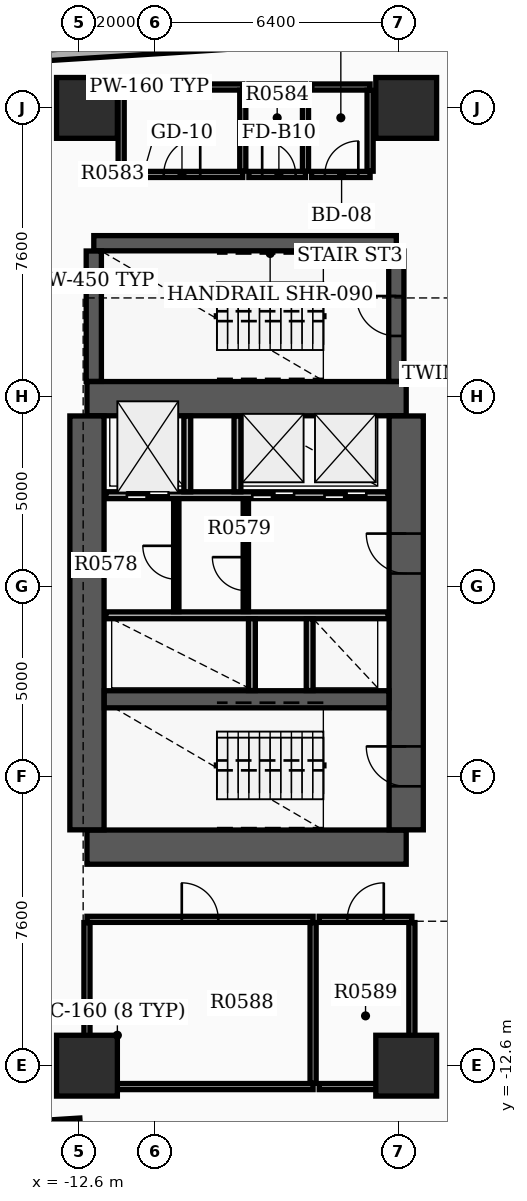
"""IFC4 building model, lengths in metres.
Left out: names, types, materials, properties, quantities, classifications, styles, units other than length and angle.
Written with IfcOpenShell. Run it as: python <this file> out.ifc"""

import sys

from ifc_helpers import new_model, si_unit, direction, frame, frame_2d, origin, origin_2d, place, context, subcontext, project, spatial, rectangle, extrude, element, fill, save


model = new_model("IFC4")
c1 = context("Model", 3, precision=1e-05, world=origin(), true_north=direction((0.0, 1.0)))
c2 = subcontext(c1, "Body", "Model", "MODEL_VIEW")
j1 = project(units=[si_unit("LENGTHUNIT", "METRE"), si_unit("PLANEANGLEUNIT", "RADIAN")], contexts=[c1])
p1 = place(None, origin())
s1 = spatial("IfcSite", under=j1, at=p1, CompositionType="ELEMENT")
p2 = place(p1, origin())
s2 = spatial("IfcBuilding", under=s1, at=p2, CompositionType="ELEMENT")
p3 = place(p2, frame((0.0, 0.0, 39.3)))
s3 = spatial("IfcBuildingStorey", under=s2, at=p3, CompositionType="ELEMENT", Elevation=39.3)
for number, where, z_axis, x_axis in (
    (1, (-12.4, -6.85, 0.0), (0.0, 0.0, 1.0), (1.0, 0.0, 0.0)),
    (2, (-12.4, 4.95, 0.0), (0.0, 0.0, 1.0), (1.0, 0.0, 0.0)),
):
    element("IfcWall", number, at=place(p3, frame(where, z_axis=z_axis, x_axis=x_axis)), inside=s3, PredefinedType="SHEAR", context=c2, shape_type="SweptSolid", body=[
        extrude(rectangle(XDim=8.4, YDim=0.9, at=frame_2d((4.2, 0.0))), origin(), (0.0, 0.0, 1.0), 3.7),
    ])
p4 = place(p3, frame((-12.4, -6.395, 0.0), z_axis=(0.0, 0.0, 1.0), x_axis=(0.0, 1.0, 0.0)))
e3 = element("IfcWall", 3, at=p4, inside=s3, PredefinedType="SHEAR", context=c2, shape_type="SweptSolid", body=[
    extrude(rectangle(XDim=10.89, YDim=0.9, at=frame_2d((5.445, 0.0))), origin(), (0.0, 0.0, 1.0), 3.7),
])
p5 = place(p3, frame((-4.0, -6.395, 0.0), z_axis=(0.0, 0.0, 1.0), x_axis=(0.0, 1.0, 0.0)))
e4 = element("IfcWall", 4, at=p5, inside=s3, PredefinedType="SHEAR", context=c2, shape_type="SweptSolid", body=[
    extrude(rectangle(XDim=10.89, YDim=0.9, at=frame_2d((5.445, 0.0))), origin(), (0.0, 0.0, 1.0), 3.7),
])
p6 = place(p5, frame((1.145, 0.0, 0.0)))
e5 = element("IfcOpeningElement", 5, at=p6, cuts=e4, PredefinedType="OPENING", context=c2, shape_type="SweptSolid", body=[
    extrude(rectangle(XDim=1.05, YDim=2.15, at=frame_2d((0.525, 1.075))), frame((0.0, 0.46, 0.0), z_axis=(0.0, -1.0, 0.0), x_axis=(1.0, 0.0, 0.0)), (0.0, 0.0, 1.0), 0.92),
])
p7 = place(p5, frame((6.745, 0.0, 0.0)))
e6 = element("IfcOpeningElement", 6, at=p7, cuts=e4, PredefinedType="OPENING", context=c2, shape_type="SweptSolid", body=[
    extrude(rectangle(XDim=1.05, YDim=2.15, at=frame_2d((0.525, 1.075))), frame((0.0, 0.46, 0.0), z_axis=(0.0, -1.0, 0.0), x_axis=(1.0, 0.0, 0.0)), (0.0, 0.0, 1.0), 0.92),
])
p8 = place(p3, frame((-11.945, -2.96, 0.0), z_axis=(0.0, 0.0, 1.0), x_axis=(1.0, 0.0, 0.0)))
e7 = element("IfcWall", 7, at=p8, inside=s3, PredefinedType="SHEAR", context=c2, shape_type="SweptSolid", body=[
    extrude(rectangle(XDim=7.49, YDim=0.45, at=frame_2d((3.745, 0.0))), origin(), (0.0, 0.0, 1.0), 3.7),
])
p9 = place(p3, frame((-12.22, 9.04, 0.0), z_axis=(0.0, 0.0, 1.0), x_axis=(1.0, 0.0, 0.0)))
e8 = element("IfcWall", 8, at=p9, inside=s3, PredefinedType="SHEAR", context=c2, shape_type="SweptSolid", body=[
    extrude(rectangle(XDim=7.96, YDim=0.4, at=frame_2d((3.98, 0.0))), origin(), (0.0, 0.0, 1.0), 3.7),
])
p10 = place(p3, frame((-12.22, 5.405, 0.0), z_axis=(0.0, 0.0, 1.0), x_axis=(0.0, 1.0, 0.0)))
e9 = element("IfcWall", 9, at=p10, inside=s3, PredefinedType="SHEAR", context=c2, shape_type="SweptSolid", body=[
    extrude(rectangle(XDim=3.43, YDim=0.4, at=frame_2d((1.715, 0.0))), origin(), (0.0, 0.0, 1.0), 3.7),
])
p11 = place(p3, frame((-4.26, 5.405, 0.0), z_axis=(0.0, 0.0, 1.0), x_axis=(0.0, 1.0, 0.0)))
e10 = element("IfcWall", 10, at=p11, inside=s3, PredefinedType="SHEAR", context=c2, shape_type="SweptSolid", body=[
    extrude(rectangle(XDim=3.43, YDim=0.4, at=frame_2d((1.715, 0.0))), origin(), (0.0, 0.0, 1.0), 3.7),
])
p12 = place(p11, frame((1.195, 0.0, 0.0)))
e11 = element("IfcOpeningElement", 11, at=p12, cuts=e10, PredefinedType="OPENING", context=c2, shape_type="SweptSolid", body=[
    extrude(rectangle(XDim=1.05, YDim=2.15, at=frame_2d((0.525, 1.075))), frame((0.0, 0.21, 0.0), z_axis=(0.0, -1.0, 0.0), x_axis=(1.0, 0.0, 0.0)), (0.0, 0.0, 1.0), 0.42),
])
for number, where, z_axis, x_axis in (
    (12, (-12.4, -12.6, 0.0), (0.0, 0.0, 1.0), (1.0, 0.0, 0.0)),
    (13, (-12.4, 12.6, 0.0), (0.0, 0.0, 1.0), (1.0, 0.0, 0.0)),
    (14, (-4.0, -12.6, 0.0), (0.0, 0.0, 1.0), (1.0, 0.0, 0.0)),
    (15, (-4.0, 12.6, 0.0), (0.0, 0.0, 1.0), (1.0, 0.0, 0.0)),
):
    element("IfcColumn", number, at=place(p3, frame(where, z_axis=z_axis, x_axis=x_axis)), inside=s3, PredefinedType="COLUMN", context=c2, shape_type="SweptSolid", body=[
        extrude(rectangle(XDim=1.6, YDim=1.6, at=origin_2d()), origin(), (0.0, 0.0, 1.0), 3.9),
    ])
p13 = place(p3, frame((-14.063, 13.945, 0.0), z_axis=(0.0, 0.0, 1.0), x_axis=(0.998027314704, 0.062781200242, 0.0)))
e16 = element("IfcWall", 16, at=p13, inside=s3, PredefinedType="STANDARD", context=c2, shape_type="SweptSolid", body=[
    extrude(rectangle(XDim=6.3, YDim=0.28, at=frame_2d((3.15, 0.0))), origin(), (0.0, 0.0, 1.0), 2.91),
])
p14 = place(p3, frame((-13.796, -14.194, 0.0), z_axis=(0.0, 0.0, 1.0), x_axis=(0.998023660242, 0.06283926796, 0.0)))
e17 = element("IfcWall", 17, at=p14, inside=s3, PredefinedType="STANDARD", context=c2, shape_type="SweptSolid", body=[
    extrude(rectangle(XDim=1.22, YDim=0.28, at=frame_2d((0.61, 0.0))), origin(), (0.0, 0.0, 1.0), 2.91),
])
p15 = place(p3, frame((-11.9, 2.41, 0.0), z_axis=(0.0, 0.0, 1.0), x_axis=(1.0, 0.0, 0.0)))
e18 = element("IfcWall", 18, at=p15, inside=s3, PredefinedType="SOLIDWALL", context=c2, shape_type="SweptSolid", body=[
    extrude(rectangle(XDim=7.42, YDim=0.18, at=frame_2d((3.71, 0.0))), origin(), (0.0, 0.0, 1.0), 2.9),
])
p16 = place(p15, frame((0.55, 0.0, 0.0)))
e19 = element("IfcOpeningElement", 19, at=p16, cuts=e18, PredefinedType="OPENING", context=c2, shape_type="SweptSolid", body=[
    extrude(rectangle(XDim=1.1, YDim=2.15, at=frame_2d((0.55, 1.075))), frame((0.0, 0.1, 0.0), z_axis=(0.0, -1.0, 0.0), x_axis=(1.0, 0.0, 0.0)), (0.0, 0.0, 1.0), 0.2),
])
p17 = place(p15, frame((3.85, 0.0, 0.0)))
e20 = element("IfcOpeningElement", 20, at=p17, cuts=e18, PredefinedType="OPENING", context=c2, shape_type="SweptSolid", body=[
    extrude(rectangle(XDim=1.1, YDim=2.15, at=frame_2d((0.55, 1.075))), frame((0.0, 0.1, 0.0), z_axis=(0.0, -1.0, 0.0), x_axis=(1.0, 0.0, 0.0)), (0.0, 0.0, 1.0), 0.2),
])
p18 = place(p15, frame((5.75, 0.0, 0.0)))
e21 = element("IfcOpeningElement", 21, at=p18, cuts=e18, PredefinedType="OPENING", context=c2, shape_type="SweptSolid", body=[
    extrude(rectangle(XDim=1.1, YDim=2.15, at=frame_2d((0.55, 1.075))), frame((0.0, 0.1, 0.0), z_axis=(0.0, -1.0, 0.0), x_axis=(1.0, 0.0, 0.0)), (0.0, 0.0, 1.0), 0.2),
])
p19 = place(p3, frame((-11.9, -0.75, 0.0), z_axis=(0.0, 0.0, 1.0), x_axis=(1.0, 0.0, 0.0)))
e22 = element("IfcWall", 22, at=p19, inside=s3, PredefinedType="SOLIDWALL", context=c2, shape_type="SweptSolid", body=[
    extrude(rectangle(XDim=7.42, YDim=0.18, at=frame_2d((3.71, 0.0))), origin(), (0.0, 0.0, 1.0), 2.9),
])
for number, where, z_axis, x_axis in (
    (23, (-9.76, 2.5, 0.0), (0.0, 0.0, 1.0), (0.0, 1.0, 0.0)),
    (24, (-8.44, 2.5, 0.0), (0.0, 0.0, 1.0), (0.0, 1.0, 0.0)),
):
    element("IfcWall", number, at=place(p3, frame(where, z_axis=z_axis, x_axis=x_axis)), inside=s3, PredefinedType="SOLIDWALL", context=c2, shape_type="SweptSolid", body=[
        extrude(rectangle(XDim=1.99, YDim=0.18, at=frame_2d((0.995, 0.0))), origin(), (0.0, 0.0, 1.0), 2.9),
    ])
for number, where, z_axis, x_axis in (
    (25, (-8.06, -2.73, 0.0), (0.0, 0.0, 1.0), (0.0, 1.0, 0.0)),
    (26, (-6.54, -2.73, 0.0), (0.0, 0.0, 1.0), (0.0, 1.0, 0.0)),
):
    element("IfcWall", number, at=place(p3, frame(where, z_axis=z_axis, x_axis=x_axis)), inside=s3, PredefinedType="SOLIDWALL", context=c2, shape_type="SweptSolid", body=[
        extrude(rectangle(XDim=1.89, YDim=0.18, at=frame_2d((0.945, 0.0))), origin(), (0.0, 0.0, 1.0), 2.9),
    ])
p20 = place(p3, frame((-8.22, -0.65, 0.0), z_axis=(0.0, 0.0, 1.0), x_axis=(0.0, 1.0, 0.0)))
e27 = element("IfcWall", 27, at=p20, inside=s3, PredefinedType="SOLIDWALL", context=c2, shape_type="SweptSolid", body=[
    extrude(rectangle(XDim=2.96, YDim=0.14, at=frame_2d((1.48, 0.0))), origin(), (0.0, 0.0, 1.0), 2.9),
])
p21 = place(p20, frame((0.55, 0.0, 0.0)))
e28 = element("IfcOpeningElement", 28, at=p21, cuts=e27, PredefinedType="OPENING", context=c2, shape_type="SweptSolid", body=[
    extrude(rectangle(XDim=0.88, YDim=2.1, at=frame_2d((0.44, 1.05))), frame((0.0, 0.08, 0.0), z_axis=(0.0, -1.0, 0.0), x_axis=(1.0, 0.0, 0.0)), (0.0, 0.0, 1.0), 0.16),
])
p22 = place(p3, frame((-10.05, -0.652, 0.0), z_axis=(0.0, 0.0, 1.0), x_axis=(0.0, 1.0, 0.0)))
e29 = element("IfcWall", 29, at=p22, inside=s3, PredefinedType="PARTITIONING", context=c2, shape_type="SweptSolid", body=[
    extrude(rectangle(XDim=2.962, YDim=0.14, at=frame_2d((1.481, 0.0))), origin(), (0.0, 0.0, 1.0), 2.9),
])
p23 = place(p22, frame((0.85, 0.0, 0.0)))
e30 = element("IfcOpeningElement", 30, at=p23, cuts=e29, PredefinedType="OPENING", context=c2, shape_type="SweptSolid", body=[
    extrude(rectangle(XDim=0.88, YDim=2.1, at=frame_2d((0.44, 1.05))), frame((0.0, 0.08, 0.0), z_axis=(0.0, -1.0, 0.0), x_axis=(1.0, 0.0, 0.0)), (0.0, 0.0, 1.0), 0.16),
])
p24 = place(p3, frame((-11.5, 10.85, 0.0), z_axis=(0.0, 0.0, 1.0), x_axis=(1.0, 0.0, 0.0)))
e31 = element("IfcWall", 31, at=p24, inside=s3, PredefinedType="PARTITIONING", context=c2, shape_type="SweptSolid", body=[
    extrude(rectangle(XDim=3.2, YDim=0.16, at=frame_2d((1.6, 0.0))), origin(), (0.0, 0.0, 1.0), 2.9),
])
p25 = place(p24, frame((1.12, 0.0, 0.0)))
e32 = element("IfcOpeningElement", 32, at=p25, cuts=e31, PredefinedType="OPENING", context=c2, shape_type="SweptSolid", body=[
    extrude(rectangle(XDim=0.96, YDim=2.15, at=frame_2d((0.48, 1.075))), frame((0.0, 0.09, 0.0), z_axis=(0.0, -1.0, 0.0), x_axis=(1.0, 0.0, 0.0)), (0.0, 0.0, 1.0), 0.18),
])
p26 = place(p3, frame((-11.5, 13.15, 0.0), z_axis=(0.0, 0.0, 1.0), x_axis=(1.0, 0.0, 0.0)))
e33 = element("IfcWall", 33, at=p26, inside=s3, PredefinedType="PARTITIONING", context=c2, shape_type="SweptSolid", body=[
    extrude(rectangle(XDim=3.2, YDim=0.16, at=frame_2d((1.6, 0.0))), origin(), (0.0, 0.0, 1.0), 2.9),
])
for number, where, z_axis, x_axis in (
    (34, (-11.5, 10.935, 0.0), (0.0, 0.0, 1.0), (0.0, 1.0, 0.0)),
    (35, (-8.3, 10.935, 0.0), (0.0, 0.0, 1.0), (0.0, 1.0, 0.0)),
):
    element("IfcWall", number, at=place(p3, frame(where, z_axis=z_axis, x_axis=x_axis)), inside=s3, PredefinedType="PARTITIONING", context=c2, shape_type="SweptSolid", body=[
        extrude(rectangle(XDim=2.13, YDim=0.16, at=frame_2d((1.065, 0.0))), origin(), (0.0, 0.0, 1.0), 2.9),
    ])
p27 = place(p3, frame((-8.14, 10.85, 0.0), z_axis=(0.0, 0.0, 1.0), x_axis=(1.0, 0.0, 0.0)))
e36 = element("IfcWall", 36, at=p27, inside=s3, PredefinedType="PARTITIONING", context=c2, shape_type="SweptSolid", body=[
    extrude(rectangle(XDim=1.49, YDim=0.16, at=frame_2d((0.745, 0.0))), origin(), (0.0, 0.0, 1.0), 2.9),
])
p28 = place(p27, frame((0.35, 0.0, 0.0)))
e37 = element("IfcOpeningElement", 37, at=p28, cuts=e36, PredefinedType="OPENING", context=c2, shape_type="SweptSolid", body=[
    extrude(rectangle(XDim=0.88, YDim=2.1, at=frame_2d((0.44, 1.05))), frame((0.0, 0.09, 0.0), z_axis=(0.0, -1.0, 0.0), x_axis=(1.0, 0.0, 0.0)), (0.0, 0.0, 1.0), 0.18),
])
p29 = place(p3, frame((-8.14, 13.15, 0.0), z_axis=(0.0, 0.0, 1.0), x_axis=(1.0, 0.0, 0.0)))
e38 = element("IfcWall", 38, at=p29, inside=s3, PredefinedType="PARTITIONING", context=c2, shape_type="SweptSolid", body=[
    extrude(rectangle(XDim=1.49, YDim=0.16, at=frame_2d((0.745, 0.0))), origin(), (0.0, 0.0, 1.0), 2.9),
])
p30 = place(p3, frame((-6.65, 10.935, 0.0), z_axis=(0.0, 0.0, 1.0), x_axis=(0.0, 1.0, 0.0)))
e39 = element("IfcWall", 39, at=p30, inside=s3, PredefinedType="PARTITIONING", context=c2, shape_type="SweptSolid", body=[
    extrude(rectangle(XDim=2.13, YDim=0.16, at=frame_2d((1.065, 0.0))), origin(), (0.0, 0.0, 1.0), 2.9),
])
p31 = place(p3, frame((-6.49, 10.85, 0.0), z_axis=(0.0, 0.0, 1.0), x_axis=(1.0, 0.0, 0.0)))
e40 = element("IfcWall", 40, at=p31, inside=s3, PredefinedType="PARTITIONING", context=c2, shape_type="SweptSolid", body=[
    extrude(rectangle(XDim=1.54, YDim=0.16, at=frame_2d((0.77, 0.0))), origin(), (0.0, 0.0, 1.0), 2.9),
])
p32 = place(p31, frame((0.35, 0.0, 0.0)))
e41 = element("IfcOpeningElement", 41, at=p32, cuts=e40, PredefinedType="OPENING", context=c2, shape_type="SweptSolid", body=[
    extrude(rectangle(XDim=0.88, YDim=2.15, at=frame_2d((0.44, 1.075))), frame((0.0, 0.09, 0.0), z_axis=(0.0, -1.0, 0.0), x_axis=(1.0, 0.0, 0.0)), (0.0, 0.0, 1.0), 0.18),
])
p33 = place(p3, frame((-6.49, 13.15, 0.0), z_axis=(0.0, 0.0, 1.0), x_axis=(1.0, 0.0, 0.0)))
e42 = element("IfcWall", 42, at=p33, inside=s3, PredefinedType="PARTITIONING", context=c2, shape_type="SweptSolid", body=[
    extrude(rectangle(XDim=1.54, YDim=0.16, at=frame_2d((0.77, 0.0))), origin(), (0.0, 0.0, 1.0), 2.9),
])
p34 = place(p3, frame((-4.95, 10.935, 0.0), z_axis=(0.0, 0.0, 1.0), x_axis=(0.0, 1.0, 0.0)))
e43 = element("IfcWall", 43, at=p34, inside=s3, PredefinedType="PARTITIONING", context=c2, shape_type="SweptSolid", body=[
    extrude(rectangle(XDim=2.13, YDim=0.16, at=frame_2d((1.065, 0.0))), origin(), (0.0, 0.0, 1.0), 2.9),
])
p35 = place(p3, frame((-12.4, -13.15, 0.0), z_axis=(0.0, 0.0, 1.0), x_axis=(1.0, 0.0, 0.0)))
e44 = element("IfcWall", 44, at=p35, inside=s3, PredefinedType="PARTITIONING", context=c2, shape_type="SweptSolid", body=[
    extrude(rectangle(XDim=5.95, YDim=0.16, at=frame_2d((2.975, 0.0))), origin(), (0.0, 0.0, 1.0), 2.9),
])
p36 = place(p3, frame((-12.4, -8.75, 0.0), z_axis=(0.0, 0.0, 1.0), x_axis=(1.0, 0.0, 0.0)))
e45 = element("IfcWall", 45, at=p36, inside=s3, PredefinedType="PARTITIONING", context=c2, shape_type="SweptSolid", body=[
    extrude(rectangle(XDim=5.95, YDim=0.16, at=frame_2d((2.975, 0.0))), origin(), (0.0, 0.0, 1.0), 2.9),
])
p37 = place(p36, frame((2.495, 0.0, 0.0)))
e46 = element("IfcOpeningElement", 46, at=p37, cuts=e45, PredefinedType="OPENING", context=c2, shape_type="SweptSolid", body=[
    extrude(rectangle(XDim=0.96, YDim=2.15, at=frame_2d((0.48, 1.075))), frame((0.0, 0.09, 0.0), z_axis=(0.0, -1.0, 0.0), x_axis=(1.0, 0.0, 0.0)), (0.0, 0.0, 1.0), 0.18),
])
for number, where, z_axis, x_axis in (
    (47, (-12.4, -13.065, 0.0), (0.0, 0.0, 1.0), (0.0, 1.0, 0.0)),
    (48, (-6.45, -13.065, 0.0), (0.0, 0.0, 1.0), (0.0, 1.0, 0.0)),
):
    element("IfcWall", number, at=place(p3, frame(where, z_axis=z_axis, x_axis=x_axis)), inside=s3, PredefinedType="PARTITIONING", context=c2, shape_type="SweptSolid", body=[
        extrude(rectangle(XDim=4.23, YDim=0.16, at=frame_2d((2.115, 0.0))), origin(), (0.0, 0.0, 1.0), 2.9),
    ])
p38 = place(p3, frame((-6.29, -13.15, 0.0), z_axis=(0.0, 0.0, 1.0), x_axis=(1.0, 0.0, 0.0)))
e49 = element("IfcWall", 49, at=p38, inside=s3, PredefinedType="PARTITIONING", context=c2, shape_type="SweptSolid", body=[
    extrude(rectangle(XDim=2.44, YDim=0.16, at=frame_2d((1.22, 0.0))), origin(), (0.0, 0.0, 1.0), 2.9),
])
p39 = place(p3, frame((-6.29, -8.75, 0.0), z_axis=(0.0, 0.0, 1.0), x_axis=(1.0, 0.0, 0.0)))
e50 = element("IfcWall", 50, at=p39, inside=s3, PredefinedType="PARTITIONING", context=c2, shape_type="SweptSolid", body=[
    extrude(rectangle(XDim=2.44, YDim=0.16, at=frame_2d((1.22, 0.0))), origin(), (0.0, 0.0, 1.0), 2.9),
])
p40 = place(p39, frame((0.74, 0.0, 0.0)))
e51 = element("IfcOpeningElement", 51, at=p40, cuts=e50, PredefinedType="OPENING", context=c2, shape_type="SweptSolid", body=[
    extrude(rectangle(XDim=0.96, YDim=2.15, at=frame_2d((0.48, 1.075))), frame((0.0, 0.09, 0.0), z_axis=(0.0, -1.0, 0.0), x_axis=(1.0, 0.0, 0.0)), (0.0, 0.0, 1.0), 0.18),
])
p41 = place(p3, frame((-3.85, -13.065, 0.0), z_axis=(0.0, 0.0, 1.0), x_axis=(0.0, 1.0, 0.0)))
e52 = element("IfcWall", 52, at=p41, inside=s3, PredefinedType="PARTITIONING", context=c2, shape_type="SweptSolid", body=[
    extrude(rectangle(XDim=4.23, YDim=0.16, at=frame_2d((2.115, 0.0))), origin(), (0.0, 0.0, 1.0), 2.9),
])
p42 = place(p6, origin())
e53 = element("IfcDoor", 53, at=p42, inside=s3, OperationType="SINGLE_SWING_RIGHT", PredefinedType="DOOR", context=c2, shape_type="SweptSolid", body=[
    extrude(rectangle(XDim=1.05, YDim=2.15, at=frame_2d((0.525, 1.075))), frame((0.0, 0.025, 0.0), z_axis=(0.0, -1.0, 0.0), x_axis=(1.0, 0.0, 0.0)), (0.0, 0.0, 1.0), 0.05),
])
fill(e5, e53)
p43 = place(p7, origin())
e54 = element("IfcDoor", 54, at=p43, inside=s3, OperationType="SINGLE_SWING_RIGHT", PredefinedType="DOOR", context=c2, shape_type="SweptSolid", body=[
    extrude(rectangle(XDim=1.05, YDim=2.15, at=frame_2d((0.525, 1.075))), frame((0.0, 0.025, 0.0), z_axis=(0.0, -1.0, 0.0), x_axis=(1.0, 0.0, 0.0)), (0.0, 0.0, 1.0), 0.05),
])
fill(e6, e54)
p44 = place(p12, origin())
e55 = element("IfcDoor", 55, at=p44, inside=s3, OperationType="SINGLE_SWING_RIGHT", PredefinedType="DOOR", context=c2, shape_type="SweptSolid", body=[
    extrude(rectangle(XDim=1.05, YDim=2.15, at=frame_2d((0.525, 1.075))), frame((0.0, 0.025, 0.0), z_axis=(0.0, -1.0, 0.0), x_axis=(1.0, 0.0, 0.0)), (0.0, 0.0, 1.0), 0.05),
])
fill(e11, e55)
p45 = place(p16, origin())
e56 = element("IfcDoor", 56, at=p45, inside=s3, OperationType="DOUBLE_DOOR_SLIDING", PredefinedType="DOOR", context=c2, shape_type="SweptSolid", body=[
    extrude(rectangle(XDim=1.1, YDim=2.15, at=frame_2d((0.55, 1.075))), frame((0.0, 0.025, 0.0), z_axis=(0.0, -1.0, 0.0), x_axis=(1.0, 0.0, 0.0)), (0.0, 0.0, 1.0), 0.05),
])
fill(e19, e56)
p46 = place(p17, origin())
e57 = element("IfcDoor", 57, at=p46, inside=s3, OperationType="DOUBLE_DOOR_SLIDING", PredefinedType="DOOR", context=c2, shape_type="SweptSolid", body=[
    extrude(rectangle(XDim=1.1, YDim=2.15, at=frame_2d((0.55, 1.075))), frame((0.0, 0.025, 0.0), z_axis=(0.0, -1.0, 0.0), x_axis=(1.0, 0.0, 0.0)), (0.0, 0.0, 1.0), 0.05),
])
fill(e20, e57)
p47 = place(p18, origin())
e58 = element("IfcDoor", 58, at=p47, inside=s3, OperationType="DOUBLE_DOOR_SLIDING", PredefinedType="DOOR", context=c2, shape_type="SweptSolid", body=[
    extrude(rectangle(XDim=1.1, YDim=2.15, at=frame_2d((0.55, 1.075))), frame((0.0, 0.025, 0.0), z_axis=(0.0, -1.0, 0.0), x_axis=(1.0, 0.0, 0.0)), (0.0, 0.0, 1.0), 0.05),
])
fill(e21, e58)
p48 = place(p21, origin())
e59 = element("IfcDoor", 59, at=p48, inside=s3, OperationType="SINGLE_SWING_RIGHT", PredefinedType="DOOR", context=c2, shape_type="SweptSolid", body=[
    extrude(rectangle(XDim=0.88, YDim=2.1, at=frame_2d((0.44, 1.05))), frame((0.0, 0.025, 0.0), z_axis=(0.0, -1.0, 0.0), x_axis=(1.0, 0.0, 0.0)), (0.0, 0.0, 1.0), 0.05),
])
fill(e28, e59)
p49 = place(p23, origin())
e60 = element("IfcDoor", 60, at=p49, inside=s3, OperationType="SINGLE_SWING_RIGHT", PredefinedType="DOOR", context=c2, shape_type="SweptSolid", body=[
    extrude(rectangle(XDim=0.88, YDim=2.1, at=frame_2d((0.44, 1.05))), frame((0.0, 0.025, 0.0), z_axis=(0.0, -1.0, 0.0), x_axis=(1.0, 0.0, 0.0)), (0.0, 0.0, 1.0), 0.05),
])
fill(e30, e60)
p50 = place(p25, origin())
e61 = element("IfcDoor", 61, at=p50, inside=s3, OperationType="SINGLE_SWING_RIGHT", PredefinedType="DOOR", context=c2, shape_type="SweptSolid", body=[
    extrude(rectangle(XDim=0.96, YDim=2.15, at=frame_2d((0.48, 1.075))), frame((0.0, 0.025, 0.0), z_axis=(0.0, -1.0, 0.0), x_axis=(1.0, 0.0, 0.0)), (0.0, 0.0, 1.0), 0.05),
])
fill(e32, e61)
p51 = place(p28, origin())
e62 = element("IfcDoor", 62, at=p51, inside=s3, OperationType="SINGLE_SWING_LEFT", PredefinedType="DOOR", context=c2, shape_type="SweptSolid", body=[
    extrude(rectangle(XDim=0.88, YDim=2.1, at=frame_2d((0.44, 1.05))), frame((0.0, 0.025, 0.0), z_axis=(0.0, -1.0, 0.0), x_axis=(1.0, 0.0, 0.0)), (0.0, 0.0, 1.0), 0.05),
])
fill(e37, e62)
p52 = place(p32, origin())
e63 = element("IfcDoor", 63, at=p52, inside=s3, OperationType="SINGLE_SWING_RIGHT", PredefinedType="DOOR", context=c2, shape_type="SweptSolid", body=[
    extrude(rectangle(XDim=0.88, YDim=2.15, at=frame_2d((0.44, 1.075))), frame((0.0, 0.025, 0.0), z_axis=(0.0, -1.0, 0.0), x_axis=(1.0, 0.0, 0.0)), (0.0, 0.0, 1.0), 0.05),
])
fill(e41, e63)
p53 = place(p37, origin())
e64 = element("IfcDoor", 64, at=p53, inside=s3, OperationType="SINGLE_SWING_LEFT", PredefinedType="DOOR", context=c2, shape_type="SweptSolid", body=[
    extrude(rectangle(XDim=0.96, YDim=2.15, at=frame_2d((0.48, 1.075))), frame((0.0, 0.025, 0.0), z_axis=(0.0, -1.0, 0.0), x_axis=(1.0, 0.0, 0.0)), (0.0, 0.0, 1.0), 0.05),
])
fill(e46, e64)
p54 = place(p40, origin())
e65 = element("IfcDoor", 65, at=p54, inside=s3, OperationType="SINGLE_SWING_RIGHT", PredefinedType="DOOR", context=c2, shape_type="SweptSolid", body=[
    extrude(rectangle(XDim=0.96, YDim=2.15, at=frame_2d((0.48, 1.075))), frame((0.0, 0.025, 0.0), z_axis=(0.0, -1.0, 0.0), x_axis=(1.0, 0.0, 0.0)), (0.0, 0.0, 1.0), 0.05),
])
fill(e51, e65)
save(model, sys.argv[1])
